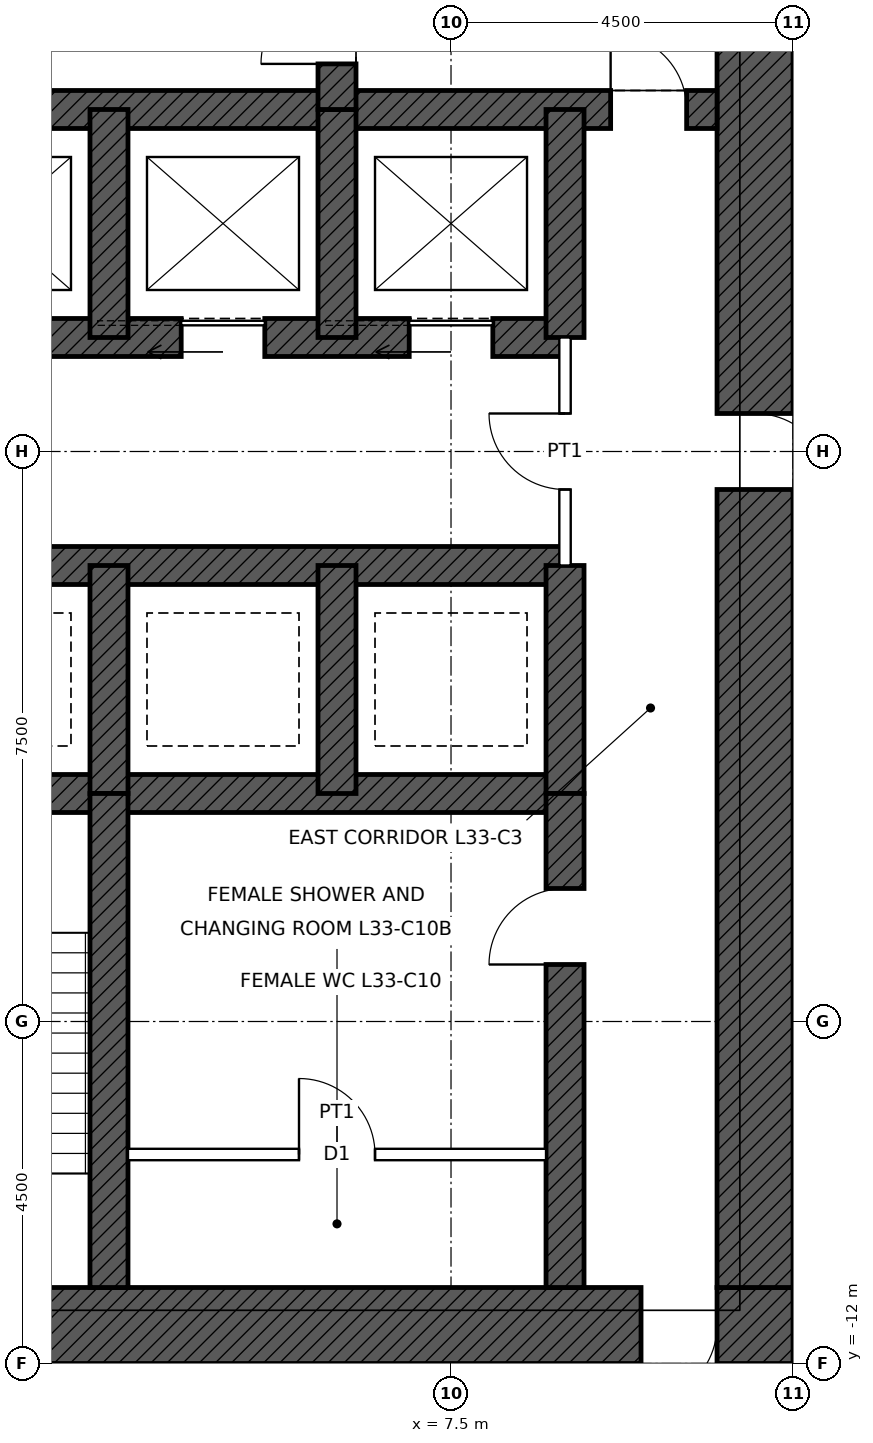
"""IFC4 building model, lengths in metres.
Left out: names, types, materials, properties, quantities, classifications, styles, units other than length and angle.
Written with IfcOpenShell. Run it as: python <this file> out.ifc"""

import sys

from ifc_helpers import new_model, si_unit, direction, frame, frame_2d, origin, place, context, subcontext, project, spatial, rectangle, extrude, element, fill, save


model = new_model("IFC4")
c1 = context("Model", 3, precision=1e-05, world=origin(), true_north=direction((0.0, 1.0)))
c2 = subcontext(c1, "Body", "Model", "MODEL_VIEW")
j1 = project(units=[si_unit("LENGTHUNIT", "METRE"), si_unit("PLANEANGLEUNIT", "RADIAN")], contexts=[c1])
p1 = place(None, origin())
s1 = spatial("IfcSite", under=j1, at=p1, CompositionType="ELEMENT")
p2 = place(p1, origin())
s2 = spatial("IfcBuilding", under=s1, at=p2, CompositionType="ELEMENT")
p3 = place(p2, frame((0.0, 0.0, 162.9)))
s3 = spatial("IfcBuildingStorey", under=s2, at=p3, CompositionType="ELEMENT", Elevation=162.9)
p4 = place(p3, frame((12.0, -11.5, 0.0), z_axis=(0.0, 0.0, 1.0), x_axis=(-1.0, 0.0, 0.0)))
e1 = element("IfcWall", 1, at=p4, inside=s3, PredefinedType="SHEAR", context=c2, shape_type="SweptSolid", body=[
    extrude(rectangle(XDim=24.0, YDim=1.0, at=frame_2d((12.0, 0.0))), origin(), (0.0, 0.0, 1.0), 4.5),
])
p5 = place(p4, frame((11.5, 0.0, 0.0)))
e2 = element("IfcOpeningElement", 2, at=p5, cuts=e1, PredefinedType="OPENING", context=c2, shape_type="SweptSolid", body=[
    extrude(rectangle(XDim=1.0, YDim=2.1, at=frame_2d((0.5, 1.05))), frame((0.0, 0.51, 0.0), z_axis=(0.0, -1.0, 0.0), x_axis=(1.0, 0.0, 0.0)), (0.0, 0.0, 1.0), 1.02),
])
p6 = place(p4, frame((1.0, 0.0, 0.0)))
e3 = element("IfcOpeningElement", 3, at=p6, cuts=e1, PredefinedType="OPENING", context=c2, shape_type="SweptSolid", body=[
    extrude(rectangle(XDim=1.0, YDim=2.4, at=frame_2d((0.5, 1.2))), frame((0.0, 0.51, 0.0), z_axis=(0.0, -1.0, 0.0), x_axis=(1.0, 0.0, 0.0)), (0.0, 0.0, 1.0), 1.02),
])
p7 = place(p3, frame((11.5, 11.0, 0.0), z_axis=(0.0, 0.0, 1.0), x_axis=(0.0, -1.0, 0.0)))
e4 = element("IfcWall", 4, at=p7, inside=s3, PredefinedType="SHEAR", context=c2, shape_type="SweptSolid", body=[
    extrude(rectangle(XDim=22.0, YDim=1.0, at=frame_2d((11.0, 0.0))), origin(), (0.0, 0.0, 1.0), 4.5),
])
p8 = place(p7, frame((10.5, 0.0, 0.0)))
e5 = element("IfcOpeningElement", 5, at=p8, cuts=e4, PredefinedType="OPENING", context=c2, shape_type="SweptSolid", body=[
    extrude(rectangle(XDim=1.0, YDim=2.4, at=frame_2d((0.5, 1.2))), frame((0.0, 0.51, 0.0), z_axis=(0.0, -1.0, 0.0), x_axis=(1.0, 0.0, 0.0)), (0.0, 0.0, 1.0), 1.02),
])
p9 = place(p3, frame((-11.0, 4.5, 0.0), z_axis=(0.0, 0.0, 1.0), x_axis=(1.0, 0.0, 0.0)))
e6 = element("IfcWall", 6, at=p9, inside=s3, PredefinedType="SHEAR", context=c2, shape_type="SweptSolid", body=[
    extrude(rectangle(XDim=22.0, YDim=0.5, at=frame_2d((11.0, 0.0))), origin(), (0.0, 0.0, 1.0), 4.5),
])
p10 = place(p9, frame((0.4, 0.0, 0.0)))
e7 = element("IfcOpeningElement", 7, at=p10, cuts=e6, PredefinedType="OPENING", context=c2, shape_type="SweptSolid", body=[
    extrude(rectangle(XDim=1.0, YDim=2.1, at=frame_2d((0.5, 1.05))), frame((0.0, 0.26, 0.0), z_axis=(0.0, -1.0, 0.0), x_axis=(1.0, 0.0, 0.0)), (0.0, 0.0, 1.0), 0.52),
])
p11 = place(p9, frame((20.6, 0.0, 0.0)))
e8 = element("IfcOpeningElement", 8, at=p11, cuts=e6, PredefinedType="OPENING", context=c2, shape_type="SweptSolid", body=[
    extrude(rectangle(XDim=1.0, YDim=2.1, at=frame_2d((0.5, 1.05))), frame((0.0, 0.26, 0.0), z_axis=(0.0, -1.0, 0.0), x_axis=(1.0, 0.0, 0.0)), (0.0, 0.0, 1.0), 0.52),
])
p12 = place(p3, frame((-9.0, 1.5, 0.0), z_axis=(0.0, 0.0, 1.0), x_axis=(1.0, 0.0, 0.0)))
e9 = element("IfcWall", 9, at=p12, inside=s3, PredefinedType="SHEAR", context=c2, shape_type="SweptSolid", body=[
    extrude(rectangle(XDim=18.0, YDim=0.5, at=frame_2d((9.0, 0.0))), origin(), (0.0, 0.0, 1.0), 4.5),
])
p13 = place(p12, frame((9.95, 0.0, 0.0)))
e10 = element("IfcOpeningElement", 10, at=p13, cuts=e9, PredefinedType="OPENING", context=c2, shape_type="SweptSolid", body=[
    extrude(rectangle(XDim=1.1, YDim=2.1, at=frame_2d((0.55, 1.05))), frame((0.0, 0.26, 0.0), z_axis=(0.0, -1.0, 0.0), x_axis=(1.0, 0.0, 0.0)), (0.0, 0.0, 1.0), 0.52),
])
p14 = place(p12, frame((12.95, 0.0, 0.0)))
e11 = element("IfcOpeningElement", 11, at=p14, cuts=e9, PredefinedType="OPENING", context=c2, shape_type="SweptSolid", body=[
    extrude(rectangle(XDim=1.1, YDim=2.1, at=frame_2d((0.55, 1.05))), frame((0.0, 0.26, 0.0), z_axis=(0.0, -1.0, 0.0), x_axis=(1.0, 0.0, 0.0)), (0.0, 0.0, 1.0), 0.52),
])
p15 = place(p12, frame((15.95, 0.0, 0.0)))
e12 = element("IfcOpeningElement", 12, at=p15, cuts=e9, PredefinedType="OPENING", context=c2, shape_type="SweptSolid", body=[
    extrude(rectangle(XDim=1.1, YDim=2.1, at=frame_2d((0.55, 1.05))), frame((0.0, 0.26, 0.0), z_axis=(0.0, -1.0, 0.0), x_axis=(1.0, 0.0, 0.0)), (0.0, 0.0, 1.0), 0.52),
])
p16 = place(p12, frame((0.95, 0.0, 0.0)))
e13 = element("IfcOpeningElement", 13, at=p16, cuts=e9, PredefinedType="OPENING", context=c2, shape_type="SweptSolid", body=[
    extrude(rectangle(XDim=1.1, YDim=2.1, at=frame_2d((0.55, 1.05))), frame((0.0, 0.26, 0.0), z_axis=(0.0, -1.0, 0.0), x_axis=(1.0, 0.0, 0.0)), (0.0, 0.0, 1.0), 0.52),
])
p17 = place(p12, frame((3.95, 0.0, 0.0)))
e14 = element("IfcOpeningElement", 14, at=p17, cuts=e9, PredefinedType="OPENING", context=c2, shape_type="SweptSolid", body=[
    extrude(rectangle(XDim=1.1, YDim=2.1, at=frame_2d((0.55, 1.05))), frame((0.0, 0.26, 0.0), z_axis=(0.0, -1.0, 0.0), x_axis=(1.0, 0.0, 0.0)), (0.0, 0.0, 1.0), 0.52),
])
p18 = place(p12, frame((6.95, 0.0, 0.0)))
e15 = element("IfcOpeningElement", 15, at=p18, cuts=e9, PredefinedType="OPENING", context=c2, shape_type="SweptSolid", body=[
    extrude(rectangle(XDim=1.1, YDim=2.1, at=frame_2d((0.55, 1.05))), frame((0.0, 0.26, 0.0), z_axis=(0.0, -1.0, 0.0), x_axis=(1.0, 0.0, 0.0)), (0.0, 0.0, 1.0), 0.52),
])
for number, where, z_axis, x_axis in (
    (16, (-9.0, -1.5, 0.0), (0.0, 0.0, 1.0), (1.0, 0.0, 0.0)),
    (17, (-9.0, -4.5, 0.0), (0.0, 0.0, 1.0), (1.0, 0.0, 0.0)),
):
    element("IfcWall", number, at=place(p3, frame(where, z_axis=z_axis, x_axis=x_axis)), inside=s3, PredefinedType="SHEAR", context=c2, shape_type="SweptSolid", body=[
        extrude(rectangle(XDim=18.0, YDim=0.5, at=frame_2d((9.0, 0.0))), origin(), (0.0, 0.0, 1.0), 4.5),
    ])
for number, where, z_axis, x_axis in (
    (18, (9.0, 1.5, 0.0), (0.0, 0.0, 1.0), (0.0, 1.0, 0.0)),
    (19, (9.0, -4.5, 0.0), (0.0, 0.0, 1.0), (0.0, 1.0, 0.0)),
    (20, (3.0, 1.5, 0.0), (0.0, 0.0, 1.0), (0.0, 1.0, 0.0)),
    (21, (6.0, 1.5, 0.0), (0.0, 0.0, 1.0), (0.0, 1.0, 0.0)),
    (22, (3.0, -4.5, 0.0), (0.0, 0.0, 1.0), (0.0, 1.0, 0.0)),
    (23, (6.0, -4.5, 0.0), (0.0, 0.0, 1.0), (0.0, 1.0, 0.0)),
):
    element("IfcWall", number, at=place(p3, frame(where, z_axis=z_axis, x_axis=x_axis)), inside=s3, PredefinedType="SHEAR", context=c2, shape_type="SweptSolid", body=[
        extrude(rectangle(XDim=3.0, YDim=0.5, at=frame_2d((1.5, 0.0))), origin(), (0.0, 0.0, 1.0), 4.5),
    ])
p19 = place(p3, frame((6.0, 4.5, 0.0), z_axis=(0.0, 0.0, 1.0), x_axis=(0.0, 1.0, 0.0)))
e24 = element("IfcWall", 24, at=p19, inside=s3, PredefinedType="SHEAR", context=c2, shape_type="SweptSolid", body=[
    extrude(rectangle(XDim=6.5, YDim=0.5, at=frame_2d((3.25, 0.0))), origin(), (0.0, 0.0, 1.0), 4.5),
])
p20 = place(p19, frame((0.6, 0.0, 0.0)))
e25 = element("IfcOpeningElement", 25, at=p20, cuts=e24, PredefinedType="OPENING", context=c2, shape_type="SweptSolid", body=[
    extrude(rectangle(XDim=1.0, YDim=2.1, at=frame_2d((0.5, 1.05))), frame((0.0, 0.26, 0.0), z_axis=(0.0, -1.0, 0.0), x_axis=(1.0, 0.0, 0.0)), (0.0, 0.0, 1.0), 0.52),
])
p21 = place(p3, frame((9.0, -11.0, 0.0), z_axis=(0.0, 0.0, 1.0), x_axis=(0.0, 1.0, 0.0)))
e26 = element("IfcWall", 26, at=p21, inside=s3, PredefinedType="SHEAR", context=c2, shape_type="SweptSolid", body=[
    extrude(rectangle(XDim=6.5, YDim=0.5, at=frame_2d((3.25, 0.0))), origin(), (0.0, 0.0, 1.0), 4.5),
])
p22 = place(p21, frame((4.25, 0.0, 0.0)))
e27 = element("IfcOpeningElement", 27, at=p22, cuts=e26, PredefinedType="OPENING", context=c2, shape_type="SweptSolid", body=[
    extrude(rectangle(XDim=1.0, YDim=2.1, at=frame_2d((0.5, 1.05))), frame((0.0, 0.26, 0.0), z_axis=(0.0, -1.0, 0.0), x_axis=(1.0, 0.0, 0.0)), (0.0, 0.0, 1.0), 0.52),
])
p23 = place(p3, frame((3.0, -11.0, 0.0), z_axis=(0.0, 0.0, 1.0), x_axis=(0.0, 1.0, 0.0)))
e28 = element("IfcWall", 28, at=p23, inside=s3, PredefinedType="SHEAR", context=c2, shape_type="SweptSolid", body=[
    extrude(rectangle(XDim=6.5, YDim=0.5, at=frame_2d((3.25, 0.0))), origin(), (0.0, 0.0, 1.0), 4.5),
])
p24 = place(p3, frame((3.25, -9.25, 0.0), z_axis=(0.0, 0.0, 1.0), x_axis=(1.0, 0.0, 0.0)))
e29 = element("IfcWall", 29, at=p24, inside=s3, PredefinedType="PARTITIONING", context=c2, shape_type="SweptSolid", body=[
    extrude(rectangle(XDim=5.5, YDim=0.15, at=frame_2d((2.75, 0.0))), origin(), (0.0, 0.0, 1.0), 4.25),
])
p25 = place(p24, frame((2.25, 0.0, 0.0)))
e30 = element("IfcOpeningElement", 30, at=p25, cuts=e29, PredefinedType="OPENING", context=c2, shape_type="SweptSolid", body=[
    extrude(rectangle(XDim=1.0, YDim=2.1, at=frame_2d((0.5, 1.05))), frame((0.0, 0.085, 0.0), z_axis=(0.0, -1.0, 0.0), x_axis=(1.0, 0.0, 0.0)), (0.0, 0.0, 1.0), 0.17),
])
p26 = place(p3, frame((9.0, -1.5, 0.0), z_axis=(0.0, 0.0, 1.0), x_axis=(0.0, 1.0, 0.0)))
e31 = element("IfcWall", 31, at=p26, inside=s3, PredefinedType="PARTITIONING", context=c2, shape_type="SweptSolid", body=[
    extrude(rectangle(XDim=3.0, YDim=0.15, at=frame_2d((1.5, 0.0))), origin(), (0.0, 0.0, 1.0), 4.25),
])
p27 = place(p26, frame((1.0, 0.0, 0.0)))
e32 = element("IfcOpeningElement", 32, at=p27, cuts=e31, PredefinedType="OPENING", context=c2, shape_type="SweptSolid", body=[
    extrude(rectangle(XDim=1.0, YDim=2.4, at=frame_2d((0.5, 1.2))), frame((0.0, 0.085, 0.0), z_axis=(0.0, -1.0, 0.0), x_axis=(1.0, 0.0, 0.0)), (0.0, 0.0, 1.0), 0.17),
])
p28 = place(p11, origin())
e33 = element("IfcDoor", 33, at=p28, inside=s3, OperationType="SINGLE_SWING_LEFT", PredefinedType="DOOR", context=c2, shape_type="SweptSolid", body=[
    extrude(rectangle(XDim=1.0, YDim=2.1, at=frame_2d((0.5, 1.05))), frame((0.0, 0.025, 0.0), z_axis=(0.0, -1.0, 0.0), x_axis=(1.0, 0.0, 0.0)), (0.0, 0.0, 1.0), 0.05),
])
fill(e8, e33)
p29 = place(p20, origin())
e34 = element("IfcDoor", 34, at=p29, inside=s3, OperationType="SINGLE_SWING_LEFT", PredefinedType="DOOR", context=c2, shape_type="SweptSolid", body=[
    extrude(rectangle(XDim=1.0, YDim=2.1, at=frame_2d((0.5, 1.05))), frame((0.0, 0.025, 0.0), z_axis=(0.0, -1.0, 0.0), x_axis=(1.0, 0.0, 0.0)), (0.0, 0.0, 1.0), 0.05),
])
fill(e25, e34)
p30 = place(p8, origin())
e35 = element("IfcDoor", 35, at=p30, inside=s3, OperationType="SINGLE_SWING_RIGHT", PredefinedType="DOOR", context=c2, shape_type="SweptSolid", body=[
    extrude(rectangle(XDim=1.0, YDim=2.4, at=frame_2d((0.5, 1.2))), frame((0.0, 0.485, 0.0), z_axis=(0.0, -1.0, 0.0), x_axis=(1.0, 0.0, 0.0)), (0.0, 0.0, 1.0), 0.05),
])
fill(e5, e35)
p31 = place(p6, origin())
e36 = element("IfcDoor", 36, at=p31, inside=s3, OperationType="SINGLE_SWING_RIGHT", PredefinedType="DOOR", context=c2, shape_type="SweptSolid", body=[
    extrude(rectangle(XDim=1.0, YDim=2.4, at=frame_2d((0.5, 1.2))), frame((0.0, 0.485, 0.0), z_axis=(0.0, -1.0, 0.0), x_axis=(1.0, 0.0, 0.0)), (0.0, 0.0, 1.0), 0.05),
])
fill(e3, e36)
p32 = place(p22, origin())
e37 = element("IfcDoor", 37, at=p32, inside=s3, OperationType="SINGLE_SWING_LEFT", PredefinedType="DOOR", context=c2, shape_type="SweptSolid", body=[
    extrude(rectangle(XDim=1.0, YDim=2.1, at=frame_2d((0.5, 1.05))), frame((0.0, 0.025, 0.0), z_axis=(0.0, -1.0, 0.0), x_axis=(1.0, 0.0, 0.0)), (0.0, 0.0, 1.0), 0.05),
])
fill(e27, e37)
p33 = place(p14, origin())
e38 = element("IfcDoor", 38, at=p33, inside=s3, OperationType="SLIDING_TO_LEFT", PredefinedType="DOOR", context=c2, shape_type="SweptSolid", body=[
    extrude(rectangle(XDim=1.1, YDim=2.1, at=frame_2d((0.55, 1.05))), frame((0.0, 0.025, 0.0), z_axis=(0.0, -1.0, 0.0), x_axis=(1.0, 0.0, 0.0)), (0.0, 0.0, 1.0), 0.05),
])
fill(e11, e38)
p34 = place(p15, origin())
e39 = element("IfcDoor", 39, at=p34, inside=s3, OperationType="SLIDING_TO_LEFT", PredefinedType="DOOR", context=c2, shape_type="SweptSolid", body=[
    extrude(rectangle(XDim=1.1, YDim=2.1, at=frame_2d((0.55, 1.05))), frame((0.0, 0.025, 0.0), z_axis=(0.0, -1.0, 0.0), x_axis=(1.0, 0.0, 0.0)), (0.0, 0.0, 1.0), 0.05),
])
fill(e12, e39)
p35 = place(p25, origin())
e40 = element("IfcDoor", 40, at=p35, inside=s3, OperationType="SINGLE_SWING_LEFT", PredefinedType="DOOR", context=c2, shape_type="SweptSolid", body=[
    extrude(rectangle(XDim=1.0, YDim=2.1, at=frame_2d((0.5, 1.05))), frame((0.0, 0.025, 0.0), z_axis=(0.0, -1.0, 0.0), x_axis=(1.0, 0.0, 0.0)), (0.0, 0.0, 1.0), 0.05),
])
fill(e30, e40)
p36 = place(p27, origin())
e41 = element("IfcDoor", 41, at=p36, inside=s3, OperationType="SINGLE_SWING_RIGHT", PredefinedType="DOOR", context=c2, shape_type="SweptSolid", body=[
    extrude(rectangle(XDim=1.0, YDim=2.4, at=frame_2d((0.5, 1.2))), frame((0.0, 0.025, 0.0), z_axis=(0.0, -1.0, 0.0), x_axis=(1.0, 0.0, 0.0)), (0.0, 0.0, 1.0), 0.05),
])
fill(e32, e41)
save(model, sys.argv[1])
